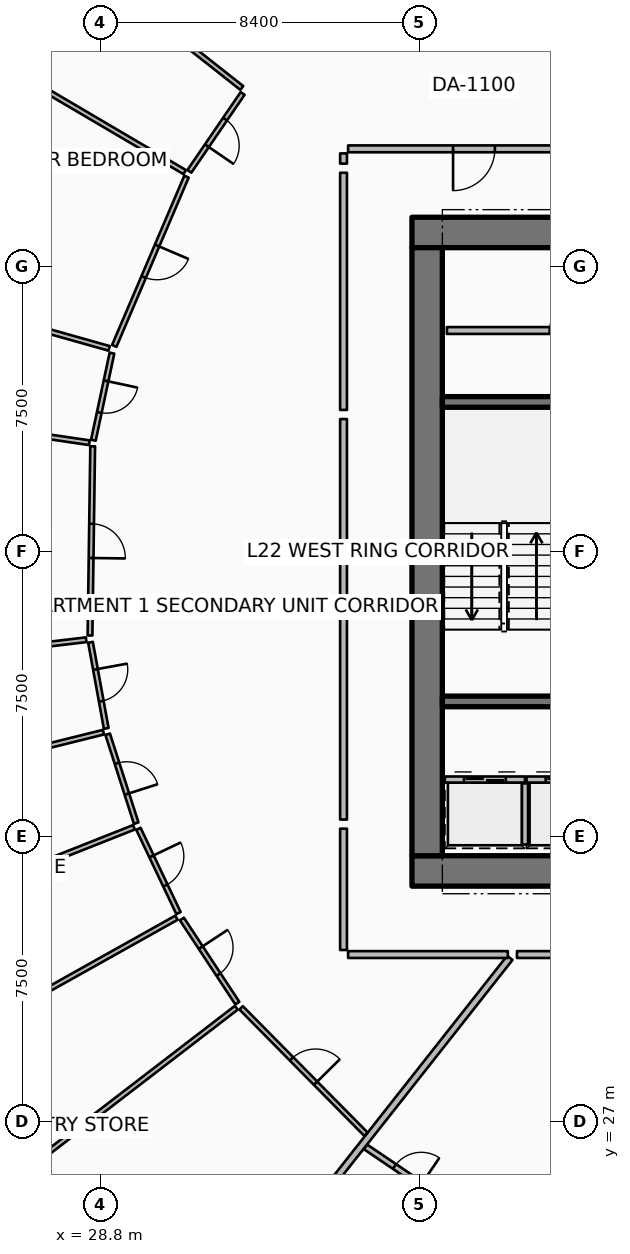
"""IFC4 building model, lengths in metres.
Left out: names, types, materials, properties, quantities, classifications, styles, units other than length and angle.
Written with IfcOpenShell. Run it as: python <this file> out.ifc"""

import sys

from ifc_helpers import new_model, si_unit, direction, frame, frame_2d, origin, place, context, subcontext, project, spatial, rectangle, extrude, element, fill, save


model = new_model("IFC4")
c1 = context("Model", 3, precision=1e-05, world=origin(), true_north=direction((0.0, 1.0)))
c2 = subcontext(c1, "Body", "Model", "MODEL_VIEW")
j1 = project(units=[si_unit("LENGTHUNIT", "METRE"), si_unit("PLANEANGLEUNIT", "RADIAN")], contexts=[c1])
p1 = place(None, origin())
s1 = spatial("IfcSite", under=j1, at=p1, CompositionType="ELEMENT")
p2 = place(p1, origin())
s2 = spatial("IfcBuilding", under=s1, at=p2, CompositionType="ELEMENT")
p3 = place(p2, frame((0.0, 0.0, 90.15)))
s3 = spatial("IfcBuildingStorey", under=s2, at=p3, CompositionType="ELEMENT", Elevation=90.15)
for number, where, z_axis, x_axis in (
    (1, (37.0, 33.6, 0.0), (0.0, 0.0, 1.0), (1.0, 0.0, 0.0)),
    (2, (37.0, 50.4, 0.0), (0.0, 0.0, 1.0), (1.0, 0.0, 0.0)),
):
    element("IfcWall", number, at=place(p3, frame(where, z_axis=z_axis, x_axis=x_axis)), inside=s3, PredefinedType="SHEAR", context=c2, shape_type="SweptSolid", body=[
        extrude(rectangle(XDim=9.9, YDim=0.8, at=frame_2d((4.95, 0.0))), origin(), (0.0, 0.0, 1.0), 3.75),
    ])
p4 = place(p3, frame((37.4, 34.0, 0.0), z_axis=(0.0, 0.0, 1.0), x_axis=(0.0, 1.0, 0.0)))
e3 = element("IfcWall", 3, at=p4, inside=s3, PredefinedType="SHEAR", context=c2, shape_type="SweptSolid", body=[
    extrude(rectangle(XDim=16.0, YDim=0.8, at=frame_2d((8.0, 0.0))), origin(), (0.0, 0.0, 1.0), 3.75),
])
for number, where, z_axis, x_axis in (
    (4, (37.8, 38.06, 0.0), (0.0, 0.0, 1.0), (1.0, 0.0, 0.0)),
    (5, (37.8, 45.94, 0.0), (0.0, 0.0, 1.0), (1.0, 0.0, 0.0)),
):
    element("IfcWall", number, at=place(p3, frame(where, z_axis=z_axis, x_axis=x_axis)), inside=s3, PredefinedType="SHEAR", context=c2, shape_type="SweptSolid", body=[
        extrude(rectangle(XDim=3.5, YDim=0.28, at=frame_2d((1.75, 0.0))), origin(), (0.0, 0.0, 1.0), 3.75),
    ])
p5 = place(p3, frame((37.865, 36.005, 0.0), z_axis=(0.0, 0.0, 1.0), x_axis=(1.0, 0.0, 0.0)))
e6 = element("IfcWall", 6, at=p5, inside=s3, PredefinedType="PARTITIONING", context=c2, shape_type="SweptSolid", body=[
    extrude(rectangle(XDim=2.11, YDim=0.16, at=frame_2d((1.055, 0.0))), origin(), (0.0, 0.0, 1.0), 3.5),
])
p6 = place(p5, frame((0.505, 0.0, 0.0)))
e7 = element("IfcOpeningElement", 7, at=p6, cuts=e6, PredefinedType="OPENING", context=c2, shape_type="SweptSolid", body=[
    extrude(rectangle(XDim=1.1, YDim=2.1, at=frame_2d((0.55, 1.05))), frame((0.0, 0.09, 0.0), z_axis=(0.0, -1.0, 0.0), x_axis=(1.0, 0.0, 0.0)), (0.0, 0.0, 1.0), 0.18),
])
p7 = place(p3, frame((39.975, 34.295, 0.0), z_axis=(0.0, 0.0, 1.0), x_axis=(0.0, 1.0, 0.0)))
e8 = element("IfcWall", 8, at=p7, inside=s3, PredefinedType="PARTITIONING", context=c2, shape_type="SweptSolid", body=[
    extrude(rectangle(XDim=1.61, YDim=0.16, at=frame_2d((0.805, 0.0))), origin(), (0.0, 0.0, 1.0), 3.5),
])
p8 = place(p3, frame((40.015, 36.005, 0.0), z_axis=(0.0, 0.0, 1.0), x_axis=(1.0, 0.0, 0.0)))
e9 = element("IfcWall", 9, at=p8, inside=s3, PredefinedType="PARTITIONING", context=c2, shape_type="SweptSolid", body=[
    extrude(rectangle(XDim=2.11, YDim=0.16, at=frame_2d((1.055, 0.0))), origin(), (0.0, 0.0, 1.0), 3.5),
])
p9 = place(p8, frame((0.505, 0.0, 0.0)))
e10 = element("IfcOpeningElement", 10, at=p9, cuts=e9, PredefinedType="OPENING", context=c2, shape_type="SweptSolid", body=[
    extrude(rectangle(XDim=1.1, YDim=2.1, at=frame_2d((0.55, 1.05))), frame((0.0, 0.09, 0.0), z_axis=(0.0, -1.0, 0.0), x_axis=(1.0, 0.0, 0.0)), (0.0, 0.0, 1.0), 0.18),
])
p10 = place(p3, frame((37.92, 47.82, 0.0), z_axis=(0.0, 0.0, 1.0), x_axis=(1.0, 0.0, 0.0)))
e11 = element("IfcWall", 11, at=p10, inside=s3, PredefinedType="PARTITIONING", context=c2, shape_type="SweptSolid", body=[
    extrude(rectangle(XDim=6.26, YDim=0.18, at=frame_2d((3.13, 0.0))), origin(), (0.0, 0.0, 1.0), 3.5),
])
p11 = place(p10, frame((2.705, 0.0, 0.0)))
e12 = element("IfcOpeningElement", 12, at=p11, cuts=e11, PredefinedType="OPENING", context=c2, shape_type="SweptSolid", body=[
    extrude(rectangle(XDim=0.85, YDim=2.06, at=frame_2d((0.425, 1.03))), frame((0.0, 0.1, 0.0), z_axis=(0.0, -1.0, 0.0), x_axis=(1.0, 0.0, 0.0)), (0.0, 0.0, 1.0), 0.2),
])
p12 = place(p3, frame((39.575, 31.314, 0.0), z_axis=(0.0, 0.0, 1.0), x_axis=(-0.619083417853, -0.785325233098, 0.0)))
e13 = element("IfcWall", 13, at=p12, inside=s3, PredefinedType="PARTITIONING", context=c2, shape_type="SweptSolid", body=[
    extrude(rectangle(XDim=15.063, YDim=0.18, at=frame_2d((7.532, 0.0))), origin(), (0.0, 0.0, 1.0), 2.94),
])
p13 = place(p3, frame((41.944, 52.6, 0.0), z_axis=(0.0, 0.0, 1.0), x_axis=(-1.0, 0.0, 0.0)))
e14 = element("IfcWall", 14, at=p13, inside=s3, PredefinedType="PARTITIONING", context=c2, shape_type="SweptSolid", body=[
    extrude(rectangle(XDim=6.624, YDim=0.18, at=frame_2d((3.312, 0.0))), origin(), (0.0, 0.0, 1.0), 2.94),
])
p14 = place(p13, frame((2.762, 0.0, 0.0)))
e15 = element("IfcOpeningElement", 15, at=p14, cuts=e14, PredefinedType="OPENING", context=c2, shape_type="SweptSolid", body=[
    extrude(rectangle(XDim=1.1, YDim=2.1, at=frame_2d((0.55, 1.05))), frame((0.0, 0.1, 0.0), z_axis=(0.0, -1.0, 0.0), x_axis=(1.0, 0.0, 0.0)), (0.0, 0.0, 1.0), 0.2),
])
p15 = place(p3, frame((35.2, 52.48, 0.0), z_axis=(0.0, 0.0, 1.0), x_axis=(0.0, -1.0, 0.0)))
e16 = element("IfcWall", 16, at=p15, inside=s3, PredefinedType="PARTITIONING", context=c2, shape_type="SweptSolid", body=[
    extrude(rectangle(XDim=0.269, YDim=0.18, at=frame_2d((0.135, 0.0))), origin(), (0.0, 0.0, 1.0), 2.94),
])
p16 = place(p3, frame((35.2, 51.971, 0.0), z_axis=(0.0, 0.0, 1.0), x_axis=(0.0, -1.0, 0.0)))
e17 = element("IfcWall", 17, at=p16, inside=s3, PredefinedType="PARTITIONING", context=c2, shape_type="SweptSolid", body=[
    extrude(rectangle(XDim=6.241, YDim=0.18, at=frame_2d((3.12, 0.0))), origin(), (0.0, 0.0, 1.0), 2.94),
])
p17 = place(p3, frame((32.522, 54.202, 0.0), z_axis=(0.0, 0.0, 1.0), x_axis=(-0.785296086335, 0.619120389574, 0.0)))
e18 = element("IfcWall", 18, at=p17, inside=s3, PredefinedType="PARTITIONING", context=c2, shape_type="SweptSolid", body=[
    extrude(rectangle(XDim=6.529, YDim=0.125, at=frame_2d((3.265, 0.0))), origin(), (0.0, 0.0, 1.0), 2.94),
])
p18 = place(p3, frame((31.021, 51.988, 0.0), z_axis=(0.0, 0.0, 1.0), x_axis=(-0.86191844443, 0.507046935846, 0.0)))
e19 = element("IfcWall", 19, at=p18, inside=s3, PredefinedType="PARTITIONING", context=c2, shape_type="SweptSolid", body=[
    extrude(rectangle(XDim=6.765, YDim=0.125, at=frame_2d((3.383, 0.0))), origin(), (0.0, 0.0, 1.0), 2.94),
])
p19 = place(p3, frame((32.544, 54.057, 0.0), z_axis=(0.0, 0.0, 1.0), x_axis=(-0.564377111566, -0.825517096092, 0.0)))
e20 = element("IfcWall", 20, at=p19, inside=s3, PredefinedType="PARTITIONING", context=c2, shape_type="SweptSolid", body=[
    extrude(rectangle(XDim=2.482, YDim=0.125, at=frame_2d((1.241, 0.0))), origin(), (0.0, 0.0, 1.0), 2.94),
])
p20 = place(p19, frame((0.816, 0.0, 0.0)))
e21 = element("IfcOpeningElement", 21, at=p20, cuts=e20, PredefinedType="OPENING", context=c2, shape_type="SweptSolid", body=[
    extrude(rectangle(XDim=0.85, YDim=2.06, at=frame_2d((0.425, 1.03))), frame((0.0, 0.073, 0.0), z_axis=(0.0, -1.0, 0.0), x_axis=(1.0, 0.0, 0.0)), (0.0, 0.0, 1.0), 0.145),
])
p21 = place(p3, frame((31.067, 51.868, 0.0), z_axis=(0.0, 0.0, 1.0), x_axis=(-0.392470533914, -0.919764578579, 0.0)))
e22 = element("IfcWall", 22, at=p21, inside=s3, PredefinedType="PARTITIONING", context=c2, shape_type="SweptSolid", body=[
    extrude(rectangle(XDim=4.842, YDim=0.125, at=frame_2d((2.421, 0.0))), origin(), (0.0, 0.0, 1.0), 2.94),
])
p22 = place(p21, frame((1.971, 0.0, 0.0)))
e23 = element("IfcOpeningElement", 23, at=p22, cuts=e22, PredefinedType="OPENING", context=c2, shape_type="SweptSolid", body=[
    extrude(rectangle(XDim=0.9, YDim=2.08, at=frame_2d((0.45, 1.04))), frame((0.0, 0.073, 0.0), z_axis=(0.0, -1.0, 0.0), x_axis=(1.0, 0.0, 0.0)), (0.0, 0.0, 1.0), 0.145),
])
p23 = place(p3, frame((35.2, 45.49, 0.0), z_axis=(0.0, 0.0, 1.0), x_axis=(0.0, -1.0, 0.0)))
e24 = element("IfcWall", 24, at=p23, inside=s3, PredefinedType="PARTITIONING", context=c2, shape_type="SweptSolid", body=[
    extrude(rectangle(XDim=4.885, YDim=0.18, at=frame_2d((2.442, 0.0))), origin(), (0.0, 0.0, 1.0), 2.94),
])
p24 = place(p3, frame((29.031, 47.35, 0.0), z_axis=(0.0, 0.0, 1.0), x_axis=(-0.962455027906, 0.271441189317, 0.0)))
e25 = element("IfcWall", 25, at=p24, inside=s3, PredefinedType="PARTITIONING", context=c2, shape_type="SweptSolid", body=[
    extrude(rectangle(XDim=8.862, YDim=0.125, at=frame_2d((4.431, 0.0))), origin(), (0.0, 0.0, 1.0), 2.94),
])
p25 = place(p3, frame((28.511, 44.867, 0.0), z_axis=(0.0, 0.0, 1.0), x_axis=(-0.989349459184, 0.145559773332, 0.0)))
e26 = element("IfcWall", 26, at=p25, inside=s3, PredefinedType="PARTITIONING", context=c2, shape_type="SweptSolid", body=[
    extrude(rectangle(XDim=8.975, YDim=0.125, at=frame_2d((4.488, 0.0))), origin(), (0.0, 0.0, 1.0), 2.94),
])
p26 = place(p3, frame((29.106, 47.225, 0.0), z_axis=(0.0, 0.0, 1.0), x_axis=(-0.208839045871, -0.977950025778, 0.0)))
e27 = element("IfcWall", 27, at=p26, inside=s3, PredefinedType="PARTITIONING", context=c2, shape_type="SweptSolid", body=[
    extrude(rectangle(XDim=2.344, YDim=0.125, at=frame_2d((1.172, 0.0))), origin(), (0.0, 0.0, 1.0), 2.94),
])
p27 = place(p26, frame((0.747, 0.0, 0.0)))
e28 = element("IfcOpeningElement", 28, at=p27, cuts=e27, PredefinedType="OPENING", context=c2, shape_type="SweptSolid", body=[
    extrude(rectangle(XDim=0.85, YDim=2.06, at=frame_2d((0.425, 1.03))), frame((0.0, 0.073, 0.0), z_axis=(0.0, -1.0, 0.0), x_axis=(1.0, 0.0, 0.0)), (0.0, 0.0, 1.0), 0.145),
])
p28 = place(p3, frame((28.599, 44.774, 0.0), z_axis=(0.0, 0.0, 1.0), x_axis=(-0.014168717323, -0.999899618687, 0.0)))
e29 = element("IfcWall", 29, at=p28, inside=s3, PredefinedType="PARTITIONING", context=c2, shape_type="SweptSolid", body=[
    extrude(rectangle(XDim=4.98, YDim=0.125, at=frame_2d((2.49, 0.0))), origin(), (0.0, 0.0, 1.0), 2.94),
])
p29 = place(p28, frame((2.04, 0.0, 0.0)))
e30 = element("IfcOpeningElement", 30, at=p29, cuts=e29, PredefinedType="OPENING", context=c2, shape_type="SweptSolid", body=[
    extrude(rectangle(XDim=0.9, YDim=2.08, at=frame_2d((0.45, 1.04))), frame((0.0, 0.073, 0.0), z_axis=(0.0, -1.0, 0.0), x_axis=(1.0, 0.0, 0.0)), (0.0, 0.0, 1.0), 0.145),
])
p30 = place(p3, frame((35.2, 40.365, 0.0), z_axis=(0.0, 0.0, 1.0), x_axis=(0.0, -1.0, 0.0)))
e31 = element("IfcWall", 31, at=p30, inside=s3, PredefinedType="PARTITIONING", context=c2, shape_type="SweptSolid", body=[
    extrude(rectangle(XDim=5.413, YDim=0.18, at=frame_2d((2.707, 0.0))), origin(), (0.0, 0.0, 1.0), 2.94),
])
p31 = place(p3, frame((28.427, 39.683, 0.0), z_axis=(0.0, 0.0, 1.0), x_axis=(-0.993070374036, -0.117521198991, 0.0)))
e32 = element("IfcWall", 32, at=p31, inside=s3, PredefinedType="PARTITIONING", context=c2, shape_type="SweptSolid", body=[
    extrude(rectangle(XDim=9.77, YDim=0.125, at=frame_2d((4.885, 0.0))), origin(), (0.0, 0.0, 1.0), 2.94),
])
p32 = place(p3, frame((28.882, 37.251, 0.0), z_axis=(0.0, 0.0, 1.0), x_axis=(-0.970501778917, -0.241093959111, 0.0)))
e33 = element("IfcWall", 33, at=p32, inside=s3, PredefinedType="PARTITIONING", context=c2, shape_type="SweptSolid", body=[
    extrude(rectangle(XDim=9.286, YDim=0.125, at=frame_2d((4.643, 0.0))), origin(), (0.0, 0.0, 1.0), 2.94),
])
p33 = place(p3, frame((29.684, 34.748, 0.0), z_axis=(0.0, 0.0, 1.0), x_axis=(-0.929782203012, -0.36811011255, 0.0)))
e34 = element("IfcWall", 34, at=p33, inside=s3, PredefinedType="PARTITIONING", context=c2, shape_type="SweptSolid", body=[
    extrude(rectangle(XDim=9.271, YDim=0.125, at=frame_2d((4.635, 0.0))), origin(), (0.0, 0.0, 1.0), 2.94),
])
p34 = place(p3, frame((28.541, 39.616, 0.0), z_axis=(0.0, 0.0, 1.0), x_axis=(0.179631908925, -0.983733895571, 0.0)))
e35 = element("IfcWall", 35, at=p34, inside=s3, PredefinedType="PARTITIONING", context=c2, shape_type="SweptSolid", body=[
    extrude(rectangle(XDim=2.302, YDim=0.125, at=frame_2d((1.151, 0.0))), origin(), (0.0, 0.0, 1.0), 2.94),
])
p35 = place(p34, frame((0.726, 0.0, 0.0)))
e36 = element("IfcOpeningElement", 36, at=p35, cuts=e35, PredefinedType="OPENING", context=c2, shape_type="SweptSolid", body=[
    extrude(rectangle(XDim=0.85, YDim=2.06, at=frame_2d((0.425, 1.03))), frame((0.0, 0.073, 0.0), z_axis=(0.0, -1.0, 0.0), x_axis=(1.0, 0.0, 0.0)), (0.0, 0.0, 1.0), 0.145),
])
p36 = place(p3, frame((28.994, 37.197, 0.0), z_axis=(0.0, 0.0, 1.0), x_axis=(0.305352731689, -0.952239313014, 0.0)))
e37 = element("IfcWall", 37, at=p36, inside=s3, PredefinedType="PARTITIONING", context=c2, shape_type="SweptSolid", body=[
    extrude(rectangle(XDim=2.456, YDim=0.125, at=frame_2d((1.228, 0.0))), origin(), (0.0, 0.0, 1.0), 2.94),
])
p37 = place(p36, frame((0.803, 0.0, 0.0)))
e38 = element("IfcOpeningElement", 38, at=p37, cuts=e37, PredefinedType="OPENING", context=c2, shape_type="SweptSolid", body=[
    extrude(rectangle(XDim=0.85, YDim=2.06, at=frame_2d((0.425, 1.03))), frame((0.0, 0.073, 0.0), z_axis=(0.0, -1.0, 0.0), x_axis=(1.0, 0.0, 0.0)), (0.0, 0.0, 1.0), 0.145),
])
p38 = place(p3, frame((29.802, 34.709, 0.0), z_axis=(0.0, 0.0, 1.0), x_axis=(0.429431892781, -0.90309924674, 0.0)))
e39 = element("IfcWall", 39, at=p38, inside=s3, PredefinedType="PARTITIONING", context=c2, shape_type="SweptSolid", body=[
    extrude(rectangle(XDim=2.456, YDim=0.125, at=frame_2d((1.228, 0.0))), origin(), (0.0, 0.0, 1.0), 2.94),
])
p39 = place(p38, frame((0.803, 0.0, 0.0)))
e40 = element("IfcOpeningElement", 40, at=p39, cuts=e39, PredefinedType="OPENING", context=c2, shape_type="SweptSolid", body=[
    extrude(rectangle(XDim=0.85, YDim=2.06, at=frame_2d((0.425, 1.03))), frame((0.0, 0.073, 0.0), z_axis=(0.0, -1.0, 0.0), x_axis=(1.0, 0.0, 0.0)), (0.0, 0.0, 1.0), 0.145),
])
p40 = place(p3, frame((35.2, 34.712, 0.0), z_axis=(0.0, 0.0, 1.0), x_axis=(0.0, -1.0, 0.0)))
e41 = element("IfcWall", 41, at=p40, inside=s3, PredefinedType="PARTITIONING", context=c2, shape_type="SweptSolid", body=[
    extrude(rectangle(XDim=3.192, YDim=0.18, at=frame_2d((1.596, 0.0))), origin(), (0.0, 0.0, 1.0), 2.94),
])
p41 = place(p3, frame((35.32, 31.4, 0.0), z_axis=(0.0, 0.0, 1.0), x_axis=(1.0, 0.0, 0.0)))
e42 = element("IfcWall", 42, at=p41, inside=s3, PredefinedType="PARTITIONING", context=c2, shape_type="SweptSolid", body=[
    extrude(rectangle(XDim=4.204, YDim=0.18, at=frame_2d((2.102, 0.0))), origin(), (0.0, 0.0, 1.0), 2.94),
])
p42 = place(p3, frame((30.804, 32.37, 0.0), z_axis=(0.0, 0.0, 1.0), x_axis=(-0.872500902675, -0.488612499668, 0.0)))
e43 = element("IfcWall", 43, at=p42, inside=s3, PredefinedType="PARTITIONING", context=c2, shape_type="SweptSolid", body=[
    extrude(rectangle(XDim=9.77, YDim=0.125, at=frame_2d((4.885, 0.0))), origin(), (0.0, 0.0, 1.0), 2.94),
])
p43 = place(p3, frame((32.378, 30.0, 0.0), z_axis=(0.0, 0.0, 1.0), x_axis=(-0.793018359225, -0.609197736315, 0.0)))
e44 = element("IfcWall", 44, at=p43, inside=s3, PredefinedType="PARTITIONING", context=c2, shape_type="SweptSolid", body=[
    extrude(rectangle(XDim=9.409, YDim=0.125, at=frame_2d((4.704, 0.0))), origin(), (0.0, 0.0, 1.0), 2.94),
])
p44 = place(p3, frame((30.946, 32.335, 0.0), z_axis=(0.0, 0.0, 1.0), x_axis=(0.55037901545, -0.83491492941, 0.0)))
e45 = element("IfcWall", 45, at=p44, inside=s3, PredefinedType="PARTITIONING", context=c2, shape_type="SweptSolid", body=[
    extrude(rectangle(XDim=2.651, YDim=0.125, at=frame_2d((1.326, 0.0))), origin(), (0.0, 0.0, 1.0), 2.94),
])
p45 = place(p44, frame((0.901, 0.0, 0.0)))
e46 = element("IfcOpeningElement", 46, at=p45, cuts=e45, PredefinedType="OPENING", context=c2, shape_type="SweptSolid", body=[
    extrude(rectangle(XDim=0.85, YDim=2.06, at=frame_2d((0.425, 1.03))), frame((0.0, 0.073, 0.0), z_axis=(0.0, -1.0, 0.0), x_axis=(1.0, 0.0, 0.0)), (0.0, 0.0, 1.0), 0.145),
])
p46 = place(p3, frame((32.506, 29.998, 0.0), z_axis=(0.0, 0.0, 1.0), x_axis=(0.702626830151, -0.711558527144, 0.0)))
e47 = element("IfcWall", 47, at=p46, inside=s3, PredefinedType="PARTITIONING", context=c2, shape_type="SweptSolid", body=[
    extrude(rectangle(XDim=4.674, YDim=0.125, at=frame_2d((2.337, 0.0))), origin(), (0.0, 0.0, 1.0), 2.94),
])
p47 = place(p46, frame((1.887, 0.0, 0.0)))
e48 = element("IfcOpeningElement", 48, at=p47, cuts=e47, PredefinedType="OPENING", context=c2, shape_type="SweptSolid", body=[
    extrude(rectangle(XDim=0.9, YDim=2.08, at=frame_2d((0.45, 1.04))), frame((0.0, 0.073, 0.0), z_axis=(0.0, -1.0, 0.0), x_axis=(1.0, 0.0, 0.0)), (0.0, 0.0, 1.0), 0.145),
])
p48 = place(p3, frame((39.764, 31.4, 0.0), z_axis=(0.0, 0.0, 1.0), x_axis=(1.0, 0.0, 0.0)))
e49 = element("IfcWall", 49, at=p48, inside=s3, PredefinedType="PARTITIONING", context=c2, shape_type="SweptSolid", body=[
    extrude(rectangle(XDim=5.127, YDim=0.18, at=frame_2d((2.563, 0.0))), origin(), (0.0, 0.0, 1.0), 2.94),
])
p49 = place(p3, frame((35.78, 26.338, 0.0), z_axis=(0.0, 0.0, 1.0), x_axis=(0.828087409359, -0.560599003264, 0.0)))
e50 = element("IfcWall", 50, at=p49, inside=s3, PredefinedType="PARTITIONING", context=c2, shape_type="SweptSolid", body=[
    extrude(rectangle(XDim=2.687, YDim=0.15, at=frame_2d((1.344, 0.0))), origin(), (0.0, 0.0, 1.0), 2.94),
])
p50 = place(p49, frame((0.918, 0.0, 0.0)))
e51 = element("IfcOpeningElement", 51, at=p50, cuts=e50, PredefinedType="OPENING", context=c2, shape_type="SweptSolid", body=[
    extrude(rectangle(XDim=0.85, YDim=2.06, at=frame_2d((0.425, 1.03))), frame((0.0, 0.085, 0.0), z_axis=(0.0, -1.0, 0.0), x_axis=(1.0, 0.0, 0.0)), (0.0, 0.0, 1.0), 0.17),
])
p51 = place(p6, origin())
e52 = element("IfcDoor", 52, at=p51, inside=s3, OperationType="DOUBLE_DOOR_SLIDING", PredefinedType="DOOR", context=c2, shape_type="SweptSolid", body=[
    extrude(rectangle(XDim=1.1, YDim=2.1, at=frame_2d((0.55, 1.05))), frame((0.0, 0.025, 0.0), z_axis=(0.0, -1.0, 0.0), x_axis=(1.0, 0.0, 0.0)), (0.0, 0.0, 1.0), 0.05),
])
fill(e7, e52)
p52 = place(p9, origin())
e53 = element("IfcDoor", 53, at=p52, inside=s3, OperationType="DOUBLE_DOOR_SLIDING", PredefinedType="DOOR", context=c2, shape_type="SweptSolid", body=[
    extrude(rectangle(XDim=1.1, YDim=2.1, at=frame_2d((0.55, 1.05))), frame((0.0, 0.025, 0.0), z_axis=(0.0, -1.0, 0.0), x_axis=(1.0, 0.0, 0.0)), (0.0, 0.0, 1.0), 0.05),
])
fill(e10, e53)
p53 = place(p11, origin())
e54 = element("IfcDoor", 54, at=p53, inside=s3, OperationType="SINGLE_SWING_RIGHT", PredefinedType="DOOR", context=c2, shape_type="SweptSolid", body=[
    extrude(rectangle(XDim=0.85, YDim=2.06, at=frame_2d((0.425, 1.03))), frame((0.0, 0.025, 0.0), z_axis=(0.0, -1.0, 0.0), x_axis=(1.0, 0.0, 0.0)), (0.0, 0.0, 1.0), 0.05),
])
fill(e12, e54)
p54 = place(p14, origin())
e55 = element("IfcDoor", 55, at=p54, inside=s3, OperationType="SINGLE_SWING_RIGHT", PredefinedType="DOOR", context=c2, shape_type="SweptSolid", body=[
    extrude(rectangle(XDim=1.1, YDim=2.1, at=frame_2d((0.55, 1.05))), frame((0.0, 0.025, 0.0), z_axis=(0.0, -1.0, 0.0), x_axis=(1.0, 0.0, 0.0)), (0.0, 0.0, 1.0), 0.05),
])
fill(e15, e55)
p55 = place(p20, origin())
e56 = element("IfcDoor", 56, at=p55, inside=s3, OperationType="SINGLE_SWING_RIGHT", PredefinedType="DOOR", context=c2, shape_type="SweptSolid", body=[
    extrude(rectangle(XDim=0.85, YDim=2.06, at=frame_2d((0.425, 1.03))), frame((0.0, 0.025, 0.0), z_axis=(0.0, -1.0, 0.0), x_axis=(1.0, 0.0, 0.0)), (0.0, 0.0, 1.0), 0.05),
])
fill(e21, e56)
p56 = place(p22, origin())
e57 = element("IfcDoor", 57, at=p56, inside=s3, OperationType="SINGLE_SWING_LEFT", PredefinedType="DOOR", context=c2, shape_type="SweptSolid", body=[
    extrude(rectangle(XDim=0.9, YDim=2.08, at=frame_2d((0.45, 1.04))), frame((0.0, 0.025, 0.0), z_axis=(0.0, -1.0, 0.0), x_axis=(1.0, 0.0, 0.0)), (0.0, 0.0, 1.0), 0.05),
])
fill(e23, e57)
p57 = place(p27, origin())
e58 = element("IfcDoor", 58, at=p57, inside=s3, OperationType="SINGLE_SWING_LEFT", PredefinedType="DOOR", context=c2, shape_type="SweptSolid", body=[
    extrude(rectangle(XDim=0.85, YDim=2.06, at=frame_2d((0.425, 1.03))), frame((0.0, 0.025, 0.0), z_axis=(0.0, -1.0, 0.0), x_axis=(1.0, 0.0, 0.0)), (0.0, 0.0, 1.0), 0.05),
])
fill(e28, e58)
p58 = place(p29, origin())
e59 = element("IfcDoor", 59, at=p58, inside=s3, OperationType="SINGLE_SWING_RIGHT", PredefinedType="DOOR", context=c2, shape_type="SweptSolid", body=[
    extrude(rectangle(XDim=0.9, YDim=2.08, at=frame_2d((0.45, 1.04))), frame((0.0, 0.025, 0.0), z_axis=(0.0, -1.0, 0.0), x_axis=(1.0, 0.0, 0.0)), (0.0, 0.0, 1.0), 0.05),
])
fill(e30, e59)
p59 = place(p35, origin())
e60 = element("IfcDoor", 60, at=p59, inside=s3, OperationType="SINGLE_SWING_LEFT", PredefinedType="DOOR", context=c2, shape_type="SweptSolid", body=[
    extrude(rectangle(XDim=0.85, YDim=2.06, at=frame_2d((0.425, 1.03))), frame((0.0, 0.025, 0.0), z_axis=(0.0, -1.0, 0.0), x_axis=(1.0, 0.0, 0.0)), (0.0, 0.0, 1.0), 0.05),
])
fill(e36, e60)
p60 = place(p37, origin())
e61 = element("IfcDoor", 61, at=p60, inside=s3, OperationType="SINGLE_SWING_RIGHT", PredefinedType="DOOR", context=c2, shape_type="SweptSolid", body=[
    extrude(rectangle(XDim=0.85, YDim=2.06, at=frame_2d((0.425, 1.03))), frame((0.0, 0.025, 0.0), z_axis=(0.0, -1.0, 0.0), x_axis=(1.0, 0.0, 0.0)), (0.0, 0.0, 1.0), 0.05),
])
fill(e38, e61)
p61 = place(p39, origin())
e62 = element("IfcDoor", 62, at=p61, inside=s3, OperationType="SINGLE_SWING_LEFT", PredefinedType="DOOR", context=c2, shape_type="SweptSolid", body=[
    extrude(rectangle(XDim=0.85, YDim=2.06, at=frame_2d((0.425, 1.03))), frame((0.0, 0.025, 0.0), z_axis=(0.0, -1.0, 0.0), x_axis=(1.0, 0.0, 0.0)), (0.0, 0.0, 1.0), 0.05),
])
fill(e40, e62)
p62 = place(p45, origin())
e63 = element("IfcDoor", 63, at=p62, inside=s3, OperationType="SINGLE_SWING_LEFT", PredefinedType="DOOR", context=c2, shape_type="SweptSolid", body=[
    extrude(rectangle(XDim=0.85, YDim=2.06, at=frame_2d((0.425, 1.03))), frame((0.0, 0.025, 0.0), z_axis=(0.0, -1.0, 0.0), x_axis=(1.0, 0.0, 0.0)), (0.0, 0.0, 1.0), 0.05),
])
fill(e46, e63)
p63 = place(p47, origin())
e64 = element("IfcDoor", 64, at=p63, inside=s3, OperationType="SINGLE_SWING_RIGHT", PredefinedType="DOOR", context=c2, shape_type="SweptSolid", body=[
    extrude(rectangle(XDim=0.9, YDim=2.08, at=frame_2d((0.45, 1.04))), frame((0.0, 0.025, 0.0), z_axis=(0.0, -1.0, 0.0), x_axis=(1.0, 0.0, 0.0)), (0.0, 0.0, 1.0), 0.05),
])
fill(e48, e64)
p64 = place(p50, origin())
e65 = element("IfcDoor", 65, at=p64, inside=s3, OperationType="SINGLE_SWING_RIGHT", PredefinedType="DOOR", context=c2, shape_type="SweptSolid", body=[
    extrude(rectangle(XDim=0.85, YDim=2.06, at=frame_2d((0.425, 1.03))), frame((0.0, 0.025, 0.0), z_axis=(0.0, -1.0, 0.0), x_axis=(1.0, 0.0, 0.0)), (0.0, 0.0, 1.0), 0.05),
])
fill(e51, e65)
save(model, sys.argv[1])
